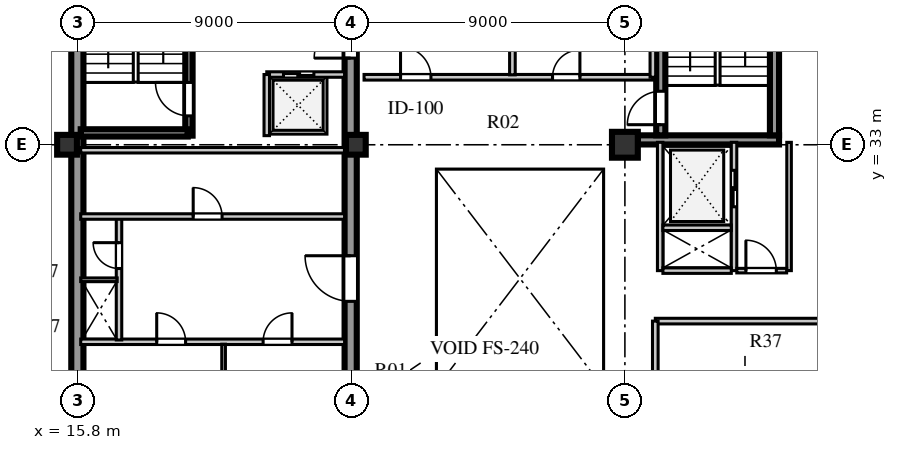
"""IFC4 building model, lengths in metres.
Left out: names, types, materials, properties, quantities, classifications, styles, units other than length and angle.
Written with IfcOpenShell. Run it as: python <this file> out.ifc"""

import sys

from ifc_helpers import new_model, si_unit, direction, frame, frame_2d, origin, origin_2d, place, context, subcontext, project, spatial, rectangle, extrude, element, fill, save


model = new_model("IFC4")
c1 = context("Model", 3, precision=1e-05, world=origin(), true_north=direction((0.0, 1.0)))
c2 = subcontext(c1, "Body", "Model", "MODEL_VIEW")
j1 = project(units=[si_unit("LENGTHUNIT", "METRE"), si_unit("PLANEANGLEUNIT", "RADIAN")], contexts=[c1])
p1 = place(None, origin())
s1 = spatial("IfcSite", under=j1, at=p1, CompositionType="ELEMENT")
p2 = place(p1, origin())
s2 = spatial("IfcBuilding", under=s1, at=p2, CompositionType="ELEMENT")
p3 = place(p2, frame((0.0, 0.0, 260.9)))
s3 = spatial("IfcBuildingStorey", under=s2, at=p3, CompositionType="ELEMENT", Elevation=260.9)
p4 = place(p3, frame((15.79, 15.81, 0.0), z_axis=(0.0, 0.0, 1.0), x_axis=(0.0, 1.0, 0.0)))
e1 = element("IfcWall", 1, at=p4, inside=s3, PredefinedType="SHEAR", context=c2, shape_type="SweptSolid", body=[
    extrude(rectangle(XDim=25.63, YDim=0.4, at=frame_2d((12.815, 0.0))), origin(), (0.0, 0.0, 1.0), 3.66),
])
p5 = place(p3, frame((24.78, 15.74, 0.0), z_axis=(0.0, 0.0, 1.0), x_axis=(0.0, 1.0, 0.0)))
e2 = element("IfcWall", 2, at=p5, inside=s3, PredefinedType="SHEAR", context=c2, shape_type="SweptSolid", body=[
    extrude(rectangle(XDim=25.76, YDim=0.4, at=frame_2d((12.88, 0.0))), origin(), (0.0, 0.0, 1.0), 3.66),
])
p6 = place(p5, frame((1.61, 0.0, 0.0)))
e3 = element("IfcOpeningElement", 3, at=p6, cuts=e2, PredefinedType="OPENING", context=c2, shape_type="SweptSolid", body=[
    extrude(rectangle(XDim=1.2, YDim=2.1, at=frame_2d((0.6, 1.05))), frame((0.0, 0.21, 0.0), z_axis=(0.0, -1.0, 0.0), x_axis=(1.0, 0.0, 0.0)), (0.0, 0.0, 1.0), 0.42),
])
p7 = place(p5, frame((6.78, 0.0, 0.0)))
e4 = element("IfcOpeningElement", 4, at=p7, cuts=e2, PredefinedType="OPENING", context=c2, shape_type="SweptSolid", body=[
    extrude(rectangle(XDim=0.85, YDim=2.06, at=frame_2d((0.425, 1.03))), frame((0.0, 0.21, 0.0), z_axis=(0.0, -1.0, 0.0), x_axis=(1.0, 0.0, 0.0)), (0.0, 0.0, 1.0), 0.42),
])
p8 = place(p5, frame((12.11, 0.0, 0.0)))
e5 = element("IfcOpeningElement", 5, at=p8, cuts=e2, PredefinedType="OPENING", context=c2, shape_type="SweptSolid", body=[
    extrude(rectangle(XDim=1.5, YDim=2.12, at=frame_2d((0.75, 1.06))), frame((0.0, 0.21, 0.0), z_axis=(0.0, -1.0, 0.0), x_axis=(1.0, 0.0, 0.0)), (0.0, 0.0, 1.0), 0.42),
])
p9 = place(p5, frame((20.11, 0.0, 0.0)))
e6 = element("IfcOpeningElement", 6, at=p9, cuts=e2, PredefinedType="OPENING", context=c2, shape_type="SweptSolid", body=[
    extrude(rectangle(XDim=1.2, YDim=2.12, at=frame_2d((0.6, 1.06))), frame((0.0, 0.21, 0.0), z_axis=(0.0, -1.0, 0.0), x_axis=(1.0, 0.0, 0.0)), (0.0, 0.0, 1.0), 0.42),
])
p10 = place(p5, frame((24.01, 0.0, 0.0)))
e7 = element("IfcOpeningElement", 7, at=p10, cuts=e2, PredefinedType="OPENING", context=c2, shape_type="SweptSolid", body=[
    extrude(rectangle(XDim=0.95, YDim=2.1, at=frame_2d((0.475, 1.05))), frame((0.0, 0.21, 0.0), z_axis=(0.0, -1.0, 0.0), x_axis=(1.0, 0.0, 0.0)), (0.0, 0.0, 1.0), 0.42),
])
p11 = place(p3, frame((34.225, 33.16, 0.0), z_axis=(0.0, 0.0, 1.0), x_axis=(1.0, 0.0, 0.0)))
e8 = element("IfcWall", 8, at=p11, inside=s3, PredefinedType="SHEAR", context=c2, shape_type="SweptSolid", body=[
    extrude(rectangle(XDim=4.645, YDim=0.3, at=frame_2d((2.323, 0.0))), origin(), (0.0, 0.0, 1.0), 3.66),
])
p12 = place(p3, frame((34.98, 33.31, 0.0), z_axis=(0.0, 0.0, 1.0), x_axis=(0.0, 1.0, 0.0)))
e9 = element("IfcWall", 9, at=p12, inside=s3, PredefinedType="SHEAR", context=c2, shape_type="SweptSolid", body=[
    extrude(rectangle(XDim=8.03, YDim=0.3, at=frame_2d((4.015, 0.0))), origin(), (0.0, 0.0, 1.0), 3.66),
])
p13 = place(p12, frame((0.35, 0.0, 0.0)))
e10 = element("IfcOpeningElement", 10, at=p13, cuts=e9, PredefinedType="OPENING", context=c2, shape_type="SweptSolid", body=[
    extrude(rectangle(XDim=1.1, YDim=2.1, at=frame_2d((0.55, 1.05))), frame((0.0, 0.16, 0.0), z_axis=(0.0, -1.0, 0.0), x_axis=(1.0, 0.0, 0.0)), (0.0, 0.0, 1.0), 0.32),
])
p14 = place(p3, frame((38.72, 33.31, 0.0), z_axis=(0.0, 0.0, 1.0), x_axis=(0.0, 1.0, 0.0)))
e11 = element("IfcWall", 11, at=p14, inside=s3, PredefinedType="SHEAR", context=c2, shape_type="SweptSolid", body=[
    extrude(rectangle(XDim=8.03, YDim=0.3, at=frame_2d((4.015, 0.0))), origin(), (0.0, 0.0, 1.0), 3.66),
])
for number, where, z_axis, x_axis in (
    (12, (15.45, 33.0, 0.0), (0.0, 0.0, 1.0), (1.0, 0.0, 0.0)),
    (13, (24.95, 33.0, 0.0), (0.0, 0.0, 1.0), (1.0, 0.0, 0.0)),
):
    element("IfcColumn", number, at=place(p3, frame(where, z_axis=z_axis, x_axis=x_axis)), inside=s3, PredefinedType="COLUMN", context=c2, shape_type="SweptSolid", body=[
        extrude(rectangle(XDim=0.65, YDim=0.65, at=origin_2d()), origin(), (0.0, 0.0, 1.0), 3.66),
    ])
p15 = place(p3, frame((33.8, 33.0, 0.0), z_axis=(0.0, 0.0, 1.0), x_axis=(1.0, 0.0, 0.0)))
e14 = element("IfcColumn", 14, at=p15, inside=s3, PredefinedType="COLUMN", context=c2, shape_type="SweptSolid", body=[
    extrude(rectangle(XDim=0.85, YDim=0.85, at=origin_2d()), origin(), (0.0, 0.0, 1.0), 3.66),
])
p16 = place(p3, frame((15.9, 26.52, 0.0), z_axis=(0.0, 0.0, 1.0), x_axis=(1.0, 0.0, 0.0)))
e15 = element("IfcWall", 15, at=p16, inside=s3, PredefinedType="SOLIDWALL", context=c2, shape_type="SweptSolid", body=[
    extrude(rectangle(XDim=8.68, YDim=0.18, at=frame_2d((4.34, 0.0))), origin(), (0.0, 0.0, 1.0), 3.66),
])
p17 = place(p16, frame((2.5, 0.0, 0.0)))
e16 = element("IfcOpeningElement", 16, at=p17, cuts=e15, PredefinedType="OPENING", context=c2, shape_type="SweptSolid", body=[
    extrude(rectangle(XDim=0.95, YDim=2.1, at=frame_2d((0.475, 1.05))), frame((0.0, 0.1, 0.0), z_axis=(0.0, -1.0, 0.0), x_axis=(1.0, 0.0, 0.0)), (0.0, 0.0, 1.0), 0.2),
])
p18 = place(p16, frame((6.0, 0.0, 0.0)))
e17 = element("IfcOpeningElement", 17, at=p18, cuts=e15, PredefinedType="OPENING", context=c2, shape_type="SweptSolid", body=[
    extrude(rectangle(XDim=0.95, YDim=2.1, at=frame_2d((0.475, 1.05))), frame((0.0, 0.1, 0.0), z_axis=(0.0, -1.0, 0.0), x_axis=(1.0, 0.0, 0.0)), (0.0, 0.0, 1.0), 0.2),
])
p19 = place(p3, frame((20.6, 24.42, 0.0), z_axis=(0.0, 0.0, 1.0), x_axis=(0.0, 1.0, 0.0)))
e18 = element("IfcWall", 18, at=p19, inside=s3, PredefinedType="PARTITIONING", context=c2, shape_type="SweptSolid", body=[
    extrude(rectangle(XDim=2.02, YDim=0.12, at=frame_2d((1.01, 0.0))), origin(), (0.0, 0.0, 1.0), 3.66),
])
p20 = place(p3, frame((17.16, 26.58, 0.0), z_axis=(0.0, 0.0, 1.0), x_axis=(0.0, 1.0, 0.0)))
e19 = element("IfcWall", 19, at=p20, inside=s3, PredefinedType="SOLIDWALL", context=c2, shape_type="SweptSolid", body=[
    extrude(rectangle(XDim=4.02, YDim=0.18, at=frame_2d((2.01, 0.0))), origin(), (0.0, 0.0, 1.0), 3.66),
])
p21 = place(p20, frame((2.35, 0.0, 0.0)))
e20 = element("IfcOpeningElement", 20, at=p21, cuts=e19, PredefinedType="OPENING", context=c2, shape_type="SweptSolid", body=[
    extrude(rectangle(XDim=0.85, YDim=2.06, at=frame_2d((0.425, 1.03))), frame((0.0, 0.1, 0.0), z_axis=(0.0, -1.0, 0.0), x_axis=(1.0, 0.0, 0.0)), (0.0, 0.0, 1.0), 0.2),
])
p22 = place(p3, frame((15.9, 28.56, 0.0), z_axis=(0.0, 0.0, 1.0), x_axis=(1.0, 0.0, 0.0)))
e21 = element("IfcWall", 21, at=p22, inside=s3, PredefinedType="PARTITIONING", context=c2, shape_type="SweptSolid", body=[
    extrude(rectangle(XDim=1.2, YDim=0.12, at=frame_2d((0.6, 0.0))), origin(), (0.0, 0.0, 1.0), 3.66),
])
p23 = place(p3, frame((15.9, 30.64, 0.0), z_axis=(0.0, 0.0, 1.0), x_axis=(1.0, 0.0, 0.0)))
e22 = element("IfcWall", 22, at=p23, inside=s3, PredefinedType="SOLIDWALL", context=c2, shape_type="SweptSolid", body=[
    extrude(rectangle(XDim=8.68, YDim=0.18, at=frame_2d((4.34, 0.0))), origin(), (0.0, 0.0, 1.0), 3.66),
])
p24 = place(p23, frame((3.7, 0.0, 0.0)))
e23 = element("IfcOpeningElement", 23, at=p24, cuts=e22, PredefinedType="OPENING", context=c2, shape_type="SweptSolid", body=[
    extrude(rectangle(XDim=0.95, YDim=2.1, at=frame_2d((0.475, 1.05))), frame((0.0, 0.1, 0.0), z_axis=(0.0, -1.0, 0.0), x_axis=(1.0, 0.0, 0.0)), (0.0, 0.0, 1.0), 0.2),
])
p25 = place(p3, frame((15.9, 32.82, 0.0), z_axis=(0.0, 0.0, 1.0), x_axis=(1.0, 0.0, 0.0)))
e24 = element("IfcWall", 24, at=p25, inside=s3, PredefinedType="SOLIDWALL", context=c2, shape_type="SweptSolid", body=[
    extrude(rectangle(XDim=8.68, YDim=0.18, at=frame_2d((4.34, 0.0))), origin(), (0.0, 0.0, 1.0), 3.06),
])
p26 = place(p3, frame((19.46, 33.3, 0.0), z_axis=(0.0, 0.0, 1.0), x_axis=(0.0, 1.0, 0.0)))
e25 = element("IfcWall", 25, at=p26, inside=s3, PredefinedType="SHEAR", context=c2, shape_type="SweptSolid", body=[
    extrude(rectangle(XDim=8.18, YDim=0.24, at=frame_2d((4.09, 0.0))), origin(), (0.0, 0.0, 1.0), 3.9),
])
p27 = place(p26, frame((0.65, 0.0, 0.0)))
e26 = element("IfcOpeningElement", 26, at=p27, cuts=e25, PredefinedType="OPENING", context=c2, shape_type="SweptSolid", body=[
    extrude(rectangle(XDim=1.1, YDim=2.1, at=frame_2d((0.55, 1.05))), frame((0.0, 0.13, 0.0), z_axis=(0.0, -1.0, 0.0), x_axis=(1.0, 0.0, 0.0)), (0.0, 0.0, 1.0), 0.26),
])
p28 = place(p3, frame((15.9, 33.39, 0.0), z_axis=(0.0, 0.0, 1.0), x_axis=(1.0, 0.0, 0.0)))
e27 = element("IfcWall", 27, at=p28, inside=s3, PredefinedType="SHEAR", context=c2, shape_type="SweptSolid", body=[
    extrude(rectangle(XDim=3.52, YDim=0.24, at=frame_2d((1.76, 0.0))), origin(), (0.0, 0.0, 1.0), 3.9),
])
p29 = place(p3, frame((22.02, 35.31, 0.0), z_axis=(0.0, 0.0, 1.0), x_axis=(1.0, 0.0, 0.0)))
e28 = element("IfcWall", 28, at=p29, inside=s3, PredefinedType="SOLIDWALL", context=c2, shape_type="SweptSolid", body=[
    extrude(rectangle(XDim=2.56, YDim=0.18, at=frame_2d((1.28, 0.0))), origin(), (0.0, 0.0, 1.0), 3.66),
])
p30 = place(p29, frame((0.55, 0.0, 0.0)))
e29 = element("IfcOpeningElement", 29, at=p30, cuts=e28, PredefinedType="OPENING", context=c2, shape_type="SweptSolid", body=[
    extrude(rectangle(XDim=1.0, YDim=2.1, at=frame_2d((0.5, 1.05))), frame((0.0, 0.1, 0.0), z_axis=(0.0, -1.0, 0.0), x_axis=(1.0, 0.0, 0.0)), (0.0, 0.0, 1.0), 0.2),
])
p31 = place(p3, frame((22.02, 33.3, 0.0), z_axis=(0.0, 0.0, 1.0), x_axis=(0.0, 1.0, 0.0)))
e30 = element("IfcWall", 30, at=p31, inside=s3, PredefinedType="SOLIDWALL", context=c2, shape_type="SweptSolid", body=[
    extrude(rectangle(XDim=2.01, YDim=0.18, at=frame_2d((1.005, 0.0))), origin(), (0.0, 0.0, 1.0), 3.66),
])
p32 = place(p3, frame((34.96, 28.86, 0.0), z_axis=(0.0, 0.0, 1.0), x_axis=(0.0, 1.0, 0.0)))
e31 = element("IfcWall", 31, at=p32, inside=s3, PredefinedType="SOLIDWALL", context=c2, shape_type="SweptSolid", body=[
    extrude(rectangle(XDim=4.22, YDim=0.18, at=frame_2d((2.11, 0.0))), origin(), (0.0, 0.0, 1.0), 3.66),
])
p33 = place(p3, frame((37.39, 28.86, 0.0), z_axis=(0.0, 0.0, 1.0), x_axis=(0.0, 1.0, 0.0)))
e32 = element("IfcWall", 32, at=p33, inside=s3, PredefinedType="SOLIDWALL", context=c2, shape_type="SweptSolid", body=[
    extrude(rectangle(XDim=4.22, YDim=0.18, at=frame_2d((2.11, 0.0))), origin(), (0.0, 0.0, 1.0), 3.66),
])
p34 = place(p33, frame((2.1, 0.0, 0.0)))
e33 = element("IfcOpeningElement", 33, at=p34, cuts=e32, PredefinedType="OPENING", context=c2, shape_type="SweptSolid", body=[
    extrude(rectangle(XDim=1.2, YDim=2.12, at=frame_2d((0.6, 1.06))), frame((0.0, 0.1, 0.0), z_axis=(0.0, -1.0, 0.0), x_axis=(1.0, 0.0, 0.0)), (0.0, 0.0, 1.0), 0.2),
])
for number, where, z_axis, x_axis in (
    (34, (35.05, 28.86, 0.0), (0.0, 0.0, 1.0), (1.0, 0.0, 0.0)),
    (35, (35.05, 30.27, 0.0), (0.0, 0.0, 1.0), (1.0, 0.0, 0.0)),
):
    element("IfcWall", number, at=place(p3, frame(where, z_axis=z_axis, x_axis=x_axis)), inside=s3, PredefinedType="SOLIDWALL", context=c2, shape_type="SweptSolid", body=[
        extrude(rectangle(XDim=2.25, YDim=0.18, at=frame_2d((1.125, 0.0))), origin(), (0.0, 0.0, 1.0), 3.66),
    ])
p35 = place(p3, frame((39.2, 28.86, 0.0), z_axis=(0.0, 0.0, 1.0), x_axis=(0.0, 1.0, 0.0)))
e36 = element("IfcWall", 36, at=p35, inside=s3, PredefinedType="PARTITIONING", context=c2, shape_type="SweptSolid", body=[
    extrude(rectangle(XDim=4.22, YDim=0.15, at=frame_2d((2.11, 0.0))), origin(), (0.0, 0.0, 1.0), 3.66),
])
p36 = place(p3, frame((37.48, 28.86, 0.0), z_axis=(0.0, 0.0, 1.0), x_axis=(1.0, 0.0, 0.0)))
e37 = element("IfcWall", 37, at=p36, inside=s3, PredefinedType="PARTITIONING", context=c2, shape_type="SweptSolid", body=[
    extrude(rectangle(XDim=1.64, YDim=0.15, at=frame_2d((0.82, 0.0))), origin(), (0.0, 0.0, 1.0), 3.66),
])
p37 = place(p36, frame((0.3, 0.0, 0.0)))
e38 = element("IfcOpeningElement", 38, at=p37, cuts=e37, PredefinedType="OPENING", context=c2, shape_type="SweptSolid", body=[
    extrude(rectangle(XDim=1.0, YDim=2.1, at=frame_2d((0.5, 1.05))), frame((0.0, 0.085, 0.0), z_axis=(0.0, -1.0, 0.0), x_axis=(1.0, 0.0, 0.0)), (0.0, 0.0, 1.0), 0.17),
])
p38 = place(p3, frame((25.22, 35.22, 0.0), z_axis=(0.0, 0.0, 1.0), x_axis=(1.0, 0.0, 0.0)))
e39 = element("IfcWall", 39, at=p38, inside=s3, PredefinedType="SOLIDWALL", context=c2, shape_type="SweptSolid", body=[
    extrude(rectangle(XDim=9.5, YDim=0.185, at=frame_2d((4.75, 0.0))), origin(), (0.0, 0.0, 1.0), 3.66),
])
p39 = place(p38, frame((1.2, 0.0, 0.0)))
e40 = element("IfcOpeningElement", 40, at=p39, cuts=e39, PredefinedType="OPENING", context=c2, shape_type="SweptSolid", body=[
    extrude(rectangle(XDim=1.0, YDim=2.08, at=frame_2d((0.5, 1.04))), frame((0.0, 0.103, 0.0), z_axis=(0.0, -1.0, 0.0), x_axis=(1.0, 0.0, 0.0)), (0.0, 0.0, 1.0), 0.205),
])
p40 = place(p38, frame((6.2, 0.0, 0.0)))
e41 = element("IfcOpeningElement", 41, at=p40, cuts=e39, PredefinedType="OPENING", context=c2, shape_type="SweptSolid", body=[
    extrude(rectangle(XDim=0.9, YDim=2.08, at=frame_2d((0.45, 1.04))), frame((0.0, 0.103, 0.0), z_axis=(0.0, -1.0, 0.0), x_axis=(1.0, 0.0, 0.0)), (0.0, 0.0, 1.0), 0.205),
])
p41 = place(p3, frame((34.72, 35.22, 0.0), z_axis=(0.0, 0.0, 1.0), x_axis=(0.0, 1.0, 0.0)))
e42 = element("IfcWall", 42, at=p41, inside=s3, PredefinedType="SOLIDWALL", context=c2, shape_type="SweptSolid", body=[
    extrude(rectangle(XDim=14.1, YDim=0.185, at=frame_2d((7.05, 0.0))), origin(), (0.0, 0.0, 1.0), 3.66),
])
p42 = place(p3, frame((30.1, 35.3, 0.0), z_axis=(0.0, 0.0, 1.0), x_axis=(0.0, 1.0, 0.0)))
e43 = element("IfcWall", 43, at=p42, inside=s3, PredefinedType="SOLIDWALL", context=c2, shape_type="SweptSolid", body=[
    extrude(rectangle(XDim=14.02, YDim=0.185, at=frame_2d((7.01, 0.0))), origin(), (0.0, 0.0, 1.0), 3.66),
])
p43 = place(p3, frame((34.8, 27.2, 0.0), z_axis=(0.0, 0.0, 1.0), x_axis=(1.0, 0.0, 0.0)))
e44 = element("IfcWall", 44, at=p43, inside=s3, PredefinedType="SOLIDWALL", context=c2, shape_type="SweptSolid", body=[
    extrude(rectangle(XDim=5.9, YDim=0.185, at=frame_2d((2.95, 0.0))), origin(), (0.0, 0.0, 1.0), 3.31),
])
p44 = place(p3, frame((34.8, 23.42, 0.0), z_axis=(0.0, 0.0, 1.0), x_axis=(0.0, 1.0, 0.0)))
e45 = element("IfcWall", 45, at=p44, inside=s3, PredefinedType="SOLIDWALL", context=c2, shape_type="SweptSolid", body=[
    extrude(rectangle(XDim=3.78, YDim=0.185, at=frame_2d((1.89, 0.0))), origin(), (0.0, 0.0, 1.0), 3.66),
])
p45 = place(p17, origin())
e46 = element("IfcDoor", 46, at=p45, inside=s3, OperationType="SINGLE_SWING_LEFT", PredefinedType="DOOR", context=c2, shape_type="SweptSolid", body=[
    extrude(rectangle(XDim=0.95, YDim=2.1, at=frame_2d((0.475, 1.05))), frame((0.0, 0.025, 0.0), z_axis=(0.0, -1.0, 0.0), x_axis=(1.0, 0.0, 0.0)), (0.0, 0.0, 1.0), 0.05),
])
fill(e16, e46)
p46 = place(p18, origin())
e47 = element("IfcDoor", 47, at=p46, inside=s3, OperationType="SINGLE_SWING_RIGHT", PredefinedType="DOOR", context=c2, shape_type="SweptSolid", body=[
    extrude(rectangle(XDim=0.95, YDim=2.1, at=frame_2d((0.475, 1.05))), frame((0.0, 0.025, 0.0), z_axis=(0.0, -1.0, 0.0), x_axis=(1.0, 0.0, 0.0)), (0.0, 0.0, 1.0), 0.05),
])
fill(e17, e47)
p47 = place(p21, origin())
e48 = element("IfcDoor", 48, at=p47, inside=s3, OperationType="SINGLE_SWING_RIGHT", PredefinedType="DOOR", context=c2, shape_type="SweptSolid", body=[
    extrude(rectangle(XDim=0.85, YDim=2.06, at=frame_2d((0.425, 1.03))), frame((0.0, 0.025, 0.0), z_axis=(0.0, -1.0, 0.0), x_axis=(1.0, 0.0, 0.0)), (0.0, 0.0, 1.0), 0.05),
])
fill(e20, e48)
p48 = place(p8, frame((1.5, 0.0, 0.0), z_axis=(0.0, 0.0, 1.0), x_axis=(-1.0, 0.0, 0.0)))
e49 = element("IfcDoor", 49, at=p48, inside=s3, OperationType="SINGLE_SWING_LEFT", PredefinedType="DOOR", context=c2, shape_type="SweptSolid", body=[
    extrude(rectangle(XDim=1.5, YDim=2.12, at=frame_2d((0.75, 1.06))), frame((0.0, 0.025, 0.0), z_axis=(0.0, -1.0, 0.0), x_axis=(1.0, 0.0, 0.0)), (0.0, 0.0, 1.0), 0.05),
])
fill(e5, e49)
p49 = place(p24, frame((0.95, 0.0, 0.0), z_axis=(0.0, 0.0, 1.0), x_axis=(-1.0, 0.0, 0.0)))
e50 = element("IfcDoor", 50, at=p49, inside=s3, OperationType="SINGLE_SWING_RIGHT", PredefinedType="DOOR", context=c2, shape_type="SweptSolid", body=[
    extrude(rectangle(XDim=0.95, YDim=2.1, at=frame_2d((0.475, 1.05))), frame((0.0, 0.025, 0.0), z_axis=(0.0, -1.0, 0.0), x_axis=(1.0, 0.0, 0.0)), (0.0, 0.0, 1.0), 0.05),
])
fill(e23, e50)
p50 = place(p27, origin())
e51 = element("IfcDoor", 51, at=p50, inside=s3, OperationType="SINGLE_SWING_RIGHT", PredefinedType="DOOR", context=c2, shape_type="SweptSolid", body=[
    extrude(rectangle(XDim=1.1, YDim=2.1, at=frame_2d((0.55, 1.05))), frame((0.0, 0.025, 0.0), z_axis=(0.0, -1.0, 0.0), x_axis=(1.0, 0.0, 0.0)), (0.0, 0.0, 1.0), 0.05),
])
fill(e26, e51)
p51 = place(p9, frame((1.2, 0.0, 0.0), z_axis=(0.0, 0.0, 1.0), x_axis=(-1.0, 0.0, 0.0)))
e52 = element("IfcDoor", 52, at=p51, inside=s3, OperationType="SINGLE_SWING_RIGHT", PredefinedType="DOOR", context=c2, shape_type="SweptSolid", body=[
    extrude(rectangle(XDim=1.2, YDim=2.12, at=frame_2d((0.6, 1.06))), frame((0.0, 0.025, 0.0), z_axis=(0.0, -1.0, 0.0), x_axis=(1.0, 0.0, 0.0)), (0.0, 0.0, 1.0), 0.05),
])
fill(e6, e52)
p52 = place(p30, origin())
e53 = element("IfcDoor", 53, at=p52, inside=s3, OperationType="DOUBLE_DOOR_SLIDING", PredefinedType="DOOR", context=c2, shape_type="SweptSolid", body=[
    extrude(rectangle(XDim=1.0, YDim=2.1, at=frame_2d((0.5, 1.05))), frame((0.0, 0.025, 0.0), z_axis=(0.0, -1.0, 0.0), x_axis=(1.0, 0.0, 0.0)), (0.0, 0.0, 1.0), 0.05),
])
fill(e29, e53)
p53 = place(p13, origin())
e54 = element("IfcDoor", 54, at=p53, inside=s3, OperationType="SINGLE_SWING_LEFT", PredefinedType="DOOR", context=c2, shape_type="SweptSolid", body=[
    extrude(rectangle(XDim=1.1, YDim=2.1, at=frame_2d((0.55, 1.05))), frame((0.0, 0.025, 0.0), z_axis=(0.0, -1.0, 0.0), x_axis=(1.0, 0.0, 0.0)), (0.0, 0.0, 1.0), 0.05),
])
fill(e10, e54)
p54 = place(p34, frame((1.2, 0.0, 0.0), z_axis=(0.0, 0.0, 1.0), x_axis=(-1.0, 0.0, 0.0)))
e55 = element("IfcDoor", 55, at=p54, inside=s3, OperationType="DOUBLE_DOOR_SLIDING", PredefinedType="DOOR", context=c2, shape_type="SweptSolid", body=[
    extrude(rectangle(XDim=1.2, YDim=2.12, at=frame_2d((0.6, 1.06))), frame((0.0, 0.025, 0.0), z_axis=(0.0, -1.0, 0.0), x_axis=(1.0, 0.0, 0.0)), (0.0, 0.0, 1.0), 0.05),
])
fill(e33, e55)
p55 = place(p37, origin())
e56 = element("IfcDoor", 56, at=p55, inside=s3, OperationType="SINGLE_SWING_LEFT", PredefinedType="DOOR", context=c2, shape_type="SweptSolid", body=[
    extrude(rectangle(XDim=1.0, YDim=2.1, at=frame_2d((0.5, 1.05))), frame((0.0, 0.025, 0.0), z_axis=(0.0, -1.0, 0.0), x_axis=(1.0, 0.0, 0.0)), (0.0, 0.0, 1.0), 0.05),
])
fill(e38, e56)
p56 = place(p39, origin())
e57 = element("IfcDoor", 57, at=p56, inside=s3, OperationType="SINGLE_SWING_LEFT", PredefinedType="DOOR", context=c2, shape_type="SweptSolid", body=[
    extrude(rectangle(XDim=1.0, YDim=2.08, at=frame_2d((0.5, 1.04))), frame((0.0, 0.025, 0.0), z_axis=(0.0, -1.0, 0.0), x_axis=(1.0, 0.0, 0.0)), (0.0, 0.0, 1.0), 0.05),
])
fill(e40, e57)
p57 = place(p40, origin())
e58 = element("IfcDoor", 58, at=p57, inside=s3, OperationType="SINGLE_SWING_RIGHT", PredefinedType="DOOR", context=c2, shape_type="SweptSolid", body=[
    extrude(rectangle(XDim=0.9, YDim=2.08, at=frame_2d((0.45, 1.04))), frame((0.0, 0.025, 0.0), z_axis=(0.0, -1.0, 0.0), x_axis=(1.0, 0.0, 0.0)), (0.0, 0.0, 1.0), 0.05),
])
fill(e41, e58)
save(model, sys.argv[1])
